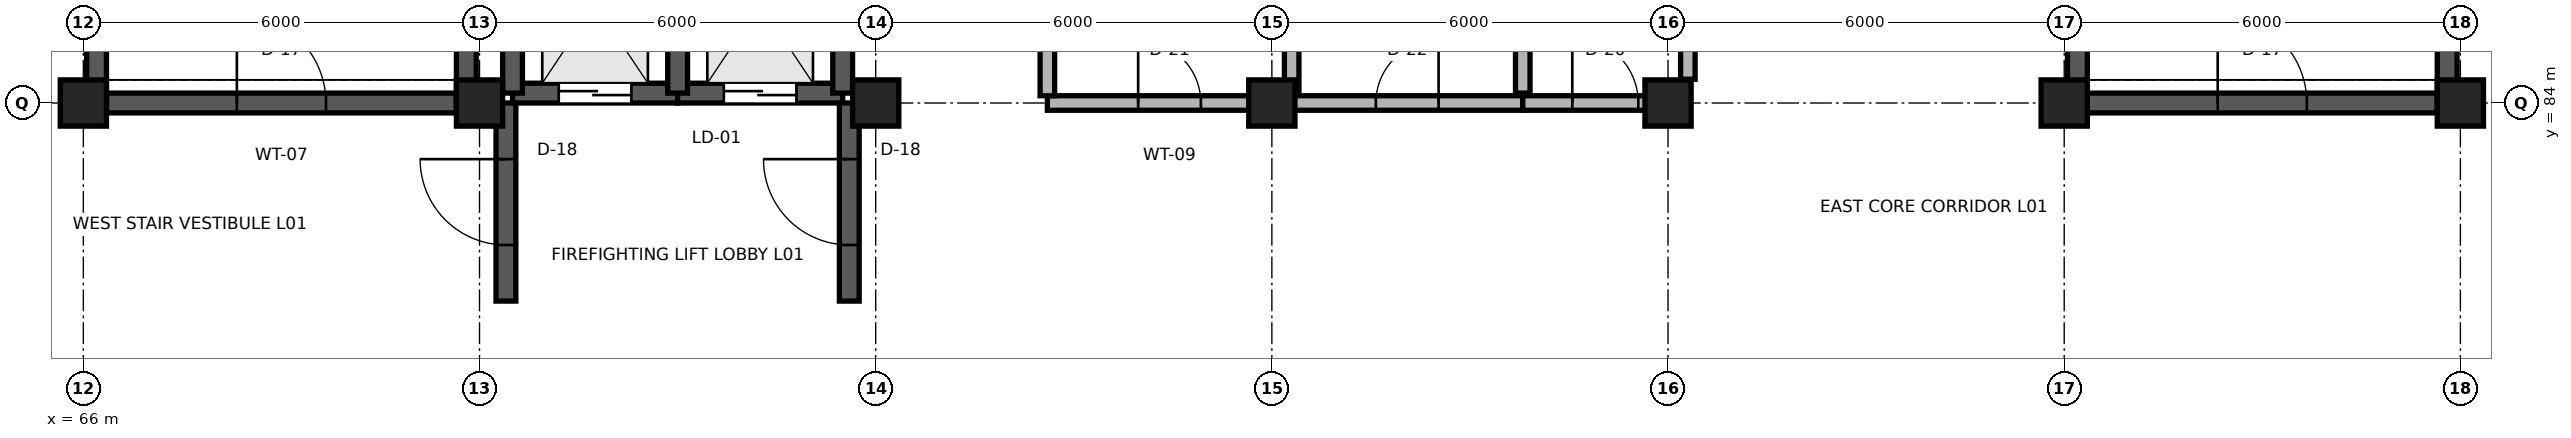
"""IFC4 building model, lengths in metres.
Left out: names, types, materials, properties, quantities, classifications, styles, units other than length and angle.
Written with IfcOpenShell. Run it as: python <this file> out.ifc"""

import sys

from ifc_helpers import new_model, si_unit, direction, frame, frame_2d, origin, origin_2d, place, context, subcontext, project, spatial, rectangle, extrude, element, fill, save


model = new_model("IFC4")
c1 = context("Model", 3, precision=1e-05, world=origin(), true_north=direction((0.0, 1.0)))
c2 = subcontext(c1, "Body", "Model", "MODEL_VIEW")
j1 = project(units=[si_unit("LENGTHUNIT", "METRE"), si_unit("PLANEANGLEUNIT", "RADIAN")], contexts=[c1])
p1 = place(None, origin())
s1 = spatial("IfcSite", under=j1, at=p1, CompositionType="ELEMENT")
p2 = place(p1, origin())
s2 = spatial("IfcBuilding", under=s1, at=p2, CompositionType="ELEMENT")
p3 = place(p2, origin())
s3 = spatial("IfcBuildingStorey", under=s2, at=p3, CompositionType="ELEMENT", Elevation=0.0)
for number, where, z_axis, x_axis in (
    (1, (66.0, 84.0, 0.0), (0.0, 0.0, 1.0), (1.0, 0.0, 0.0)),
    (2, (72.0, 84.0, 0.0), (0.0, 0.0, 1.0), (1.0, 0.0, 0.0)),
    (3, (78.0, 84.0, 0.0), (0.0, 0.0, 1.0), (1.0, 0.0, 0.0)),
    (4, (84.0, 84.0, 0.0), (0.0, 0.0, 1.0), (1.0, 0.0, 0.0)),
    (5, (90.0, 84.0, 0.0), (0.0, 0.0, 1.0), (1.0, 0.0, 0.0)),
    (6, (96.0, 84.0, 0.0), (0.0, 0.0, 1.0), (1.0, 0.0, 0.0)),
    (7, (102.0, 84.0, 0.0), (0.0, 0.0, 1.0), (1.0, 0.0, 0.0)),
):
    element("IfcColumn", number, at=place(p3, frame(where, z_axis=z_axis, x_axis=x_axis)), inside=s3, PredefinedType="COLUMN", context=c2, shape_type="SweptSolid", body=[
        extrude(rectangle(XDim=0.7, YDim=0.7, at=origin_2d()), origin(), (0.0, 0.0, 1.0), 6.0),
    ])
p4 = place(p3, frame((66.35, 84.0, 0.0), z_axis=(0.0, 0.0, 1.0), x_axis=(1.0, 0.0, 0.0)))
e8 = element("IfcWall", 8, at=p4, inside=s3, PredefinedType="SHEAR", context=c2, shape_type="SweptSolid", body=[
    extrude(rectangle(XDim=5.3, YDim=0.3, at=frame_2d((2.65, 0.0))), origin(), (0.0, 0.0, 1.0), 5.76),
])
p5 = place(p4, frame((1.975, 0.0, 0.0)))
e9 = element("IfcOpeningElement", 9, at=p5, cuts=e8, PredefinedType="OPENING", context=c2, shape_type="SweptSolid", body=[
    extrude(rectangle(XDim=1.35, YDim=2.2, at=frame_2d((0.675, 1.1))), frame((0.0, 0.165, 0.0), z_axis=(0.0, -1.0, 0.0), x_axis=(1.0, 0.0, 0.0)), (0.0, 0.0, 1.0), 0.33),
])
for number, where, z_axis, x_axis in (
    (10, (66.2, 84.0, 0.0), (0.0, 0.0, 1.0), (0.0, 1.0, 0.0)),
    (11, (71.8, 84.0, 0.0), (0.0, 0.0, 1.0), (0.0, 1.0, 0.0)),
):
    element("IfcWall", number, at=place(p3, frame(where, z_axis=z_axis, x_axis=x_axis)), inside=s3, PredefinedType="SHEAR", context=c2, shape_type="SweptSolid", body=[
        extrude(rectangle(XDim=11.8, YDim=0.3, at=frame_2d((5.9, 0.0))), origin(), (0.0, 0.0, 1.0), 5.76),
    ])
p6 = place(p3, frame((96.35, 84.0, 0.0), z_axis=(0.0, 0.0, 1.0), x_axis=(1.0, 0.0, 0.0)))
e12 = element("IfcWall", 12, at=p6, inside=s3, PredefinedType="SHEAR", context=c2, shape_type="SweptSolid", body=[
    extrude(rectangle(XDim=5.3, YDim=0.3, at=frame_2d((2.65, 0.0))), origin(), (0.0, 0.0, 1.0), 5.76),
])
p7 = place(p6, frame((1.975, 0.0, 0.0)))
e13 = element("IfcOpeningElement", 13, at=p7, cuts=e12, PredefinedType="OPENING", context=c2, shape_type="SweptSolid", body=[
    extrude(rectangle(XDim=1.35, YDim=2.2, at=frame_2d((0.675, 1.1))), frame((0.0, 0.165, 0.0), z_axis=(0.0, -1.0, 0.0), x_axis=(1.0, 0.0, 0.0)), (0.0, 0.0, 1.0), 0.33),
])
for number, where, z_axis, x_axis in (
    (14, (96.2, 84.0, 0.0), (0.0, 0.0, 1.0), (0.0, 1.0, 0.0)),
    (15, (101.8, 84.0, 0.0), (0.0, 0.0, 1.0), (0.0, 1.0, 0.0)),
):
    element("IfcWall", number, at=place(p3, frame(where, z_axis=z_axis, x_axis=x_axis)), inside=s3, PredefinedType="SHEAR", context=c2, shape_type="SweptSolid", body=[
        extrude(rectangle(XDim=11.8, YDim=0.3, at=frame_2d((5.9, 0.0))), origin(), (0.0, 0.0, 1.0), 5.76),
    ])
p8 = place(p3, frame((72.5, 84.15, 0.0), z_axis=(0.0, 0.0, 1.0), x_axis=(1.0, 0.0, 0.0)))
e16 = element("IfcWall", 16, at=p8, inside=s3, PredefinedType="SHEAR", context=c2, shape_type="SweptSolid", body=[
    extrude(rectangle(XDim=2.5, YDim=0.3, at=frame_2d((1.25, 0.0))), origin(), (0.0, 0.0, 1.0), 5.76),
])
p9 = place(p8, frame((0.7, 0.0, 0.0)))
e17 = element("IfcOpeningElement", 17, at=p9, cuts=e16, PredefinedType="OPENING", context=c2, shape_type="SweptSolid", body=[
    extrude(rectangle(XDim=1.1, YDim=2.1, at=frame_2d((0.55, 1.05))), frame((0.0, 0.165, 0.0), z_axis=(0.0, -1.0, 0.0), x_axis=(1.0, 0.0, 0.0)), (0.0, 0.0, 1.0), 0.33),
])
p10 = place(p3, frame((72.5, 84.15, 0.0), z_axis=(0.0, 0.0, 1.0), x_axis=(0.0, 1.0, 0.0)))
e18 = element("IfcWall", 18, at=p10, inside=s3, PredefinedType="SHEAR", context=c2, shape_type="SweptSolid", body=[
    extrude(rectangle(XDim=3.4, YDim=0.3, at=frame_2d((1.7, 0.0))), origin(), (0.0, 0.0, 1.0), 5.76),
])
p11 = place(p3, frame((75.0, 84.15, 0.0), z_axis=(0.0, 0.0, 1.0), x_axis=(1.0, 0.0, 0.0)))
e19 = element("IfcWall", 19, at=p11, inside=s3, PredefinedType="SHEAR", context=c2, shape_type="SweptSolid", body=[
    extrude(rectangle(XDim=2.5, YDim=0.3, at=frame_2d((1.25, 0.0))), origin(), (0.0, 0.0, 1.0), 5.76),
])
p12 = place(p11, frame((0.7, 0.0, 0.0)))
e20 = element("IfcOpeningElement", 20, at=p12, cuts=e19, PredefinedType="OPENING", context=c2, shape_type="SweptSolid", body=[
    extrude(rectangle(XDim=1.1, YDim=2.1, at=frame_2d((0.55, 1.05))), frame((0.0, 0.165, 0.0), z_axis=(0.0, -1.0, 0.0), x_axis=(1.0, 0.0, 0.0)), (0.0, 0.0, 1.0), 0.33),
])
for number, where, z_axis, x_axis in (
    (21, (75.0, 84.15, 0.0), (0.0, 0.0, 1.0), (0.0, 1.0, 0.0)),
    (22, (77.5, 84.15, 0.0), (0.0, 0.0, 1.0), (0.0, 1.0, 0.0)),
):
    element("IfcWall", number, at=place(p3, frame(where, z_axis=z_axis, x_axis=x_axis)), inside=s3, PredefinedType="SHEAR", context=c2, shape_type="SweptSolid", body=[
        extrude(rectangle(XDim=3.4, YDim=0.3, at=frame_2d((1.7, 0.0))), origin(), (0.0, 0.0, 1.0), 5.76),
    ])
p13 = place(p3, frame((72.4, 81.0, 0.0), z_axis=(0.0, 0.0, 1.0), x_axis=(0.0, 1.0, 0.0)))
e23 = element("IfcWall", 23, at=p13, inside=s3, PredefinedType="SHEAR", context=c2, shape_type="SweptSolid", body=[
    extrude(rectangle(XDim=3.0, YDim=0.3, at=frame_2d((1.5, 0.0))), origin(), (0.0, 0.0, 1.0), 5.76),
])
p14 = place(p13, frame((0.85, 0.0, 0.0)))
e24 = element("IfcOpeningElement", 24, at=p14, cuts=e23, PredefinedType="OPENING", context=c2, shape_type="SweptSolid", body=[
    extrude(rectangle(XDim=1.3, YDim=2.2, at=frame_2d((0.65, 1.1))), frame((0.0, 0.165, 0.0), z_axis=(0.0, -1.0, 0.0), x_axis=(1.0, 0.0, 0.0)), (0.0, 0.0, 1.0), 0.33),
])
p15 = place(p3, frame((77.6, 81.0, 0.0), z_axis=(0.0, 0.0, 1.0), x_axis=(0.0, 1.0, 0.0)))
e25 = element("IfcWall", 25, at=p15, inside=s3, PredefinedType="SHEAR", context=c2, shape_type="SweptSolid", body=[
    extrude(rectangle(XDim=3.0, YDim=0.3, at=frame_2d((1.5, 0.0))), origin(), (0.0, 0.0, 1.0), 5.76),
])
p16 = place(p15, frame((0.85, 0.0, 0.0)))
e26 = element("IfcOpeningElement", 26, at=p16, cuts=e25, PredefinedType="OPENING", context=c2, shape_type="SweptSolid", body=[
    extrude(rectangle(XDim=1.3, YDim=2.2, at=frame_2d((0.65, 1.1))), frame((0.0, 0.165, 0.0), z_axis=(0.0, -1.0, 0.0), x_axis=(1.0, 0.0, 0.0)), (0.0, 0.0, 1.0), 0.33),
])
p17 = place(p3, frame((80.6, 84.0, 0.0), z_axis=(0.0, 0.0, 1.0), x_axis=(1.0, 0.0, 0.0)))
e27 = element("IfcWall", 27, at=p17, inside=s3, PredefinedType="PARTITIONING", context=c2, shape_type="SweptSolid", body=[
    extrude(rectangle(XDim=3.7, YDim=0.22, at=frame_2d((1.85, 0.0))), origin(), (0.0, 0.0, 1.0), 5.32),
])
p18 = place(p17, frame((1.375, 0.0, 0.0)))
e28 = element("IfcOpeningElement", 28, at=p18, cuts=e27, PredefinedType="OPENING", context=c2, shape_type="SweptSolid", body=[
    extrude(rectangle(XDim=0.95, YDim=2.15, at=frame_2d((0.475, 1.075))), frame((0.0, 0.125, 0.0), z_axis=(0.0, -1.0, 0.0), x_axis=(1.0, 0.0, 0.0)), (0.0, 0.0, 1.0), 0.25),
])
p19 = place(p3, frame((84.3, 84.0, 0.0), z_axis=(0.0, 0.0, 1.0), x_axis=(1.0, 0.0, 0.0)))
e29 = element("IfcWall", 29, at=p19, inside=s3, PredefinedType="PARTITIONING", context=c2, shape_type="SweptSolid", body=[
    extrude(rectangle(XDim=3.5, YDim=0.22, at=frame_2d((1.75, 0.0))), origin(), (0.0, 0.0, 1.0), 5.32),
])
p20 = place(p19, frame((1.275, 0.0, 0.0)))
e30 = element("IfcOpeningElement", 30, at=p20, cuts=e29, PredefinedType="OPENING", context=c2, shape_type="SweptSolid", body=[
    extrude(rectangle(XDim=0.95, YDim=2.1, at=frame_2d((0.475, 1.05))), frame((0.0, 0.125, 0.0), z_axis=(0.0, -1.0, 0.0), x_axis=(1.0, 0.0, 0.0)), (0.0, 0.0, 1.0), 0.25),
])
p21 = place(p3, frame((87.8, 84.0, 0.0), z_axis=(0.0, 0.0, 1.0), x_axis=(1.0, 0.0, 0.0)))
e31 = element("IfcWall", 31, at=p21, inside=s3, PredefinedType="PARTITIONING", context=c2, shape_type="SweptSolid", body=[
    extrude(rectangle(XDim=2.5, YDim=0.22, at=frame_2d((1.25, 0.0))), origin(), (0.0, 0.0, 1.0), 5.32),
])
p22 = place(p21, frame((0.75, 0.0, 0.0)))
e32 = element("IfcOpeningElement", 32, at=p22, cuts=e31, PredefinedType="OPENING", context=c2, shape_type="SweptSolid", body=[
    extrude(rectangle(XDim=1.0, YDim=2.15, at=frame_2d((0.5, 1.075))), frame((0.0, 0.125, 0.0), z_axis=(0.0, -1.0, 0.0), x_axis=(1.0, 0.0, 0.0)), (0.0, 0.0, 1.0), 0.25),
])
for number, where, z_axis, x_axis in (
    (33, (84.3, 84.15, 0.0), (0.0, 0.0, 1.0), (0.0, 1.0, 0.0)),
    (34, (87.8, 84.15, 0.0), (0.0, 0.0, 1.0), (0.0, 1.0, 0.0)),
):
    element("IfcWall", number, at=place(p3, frame(where, z_axis=z_axis, x_axis=x_axis)), inside=s3, PredefinedType="PARTITIONING", context=c2, shape_type="SweptSolid", body=[
        extrude(rectangle(XDim=5.0, YDim=0.22, at=frame_2d((2.5, 0.0))), origin(), (0.0, 0.0, 1.0), 5.76),
    ])
p23 = place(p3, frame((80.6, 84.11, 0.0), z_axis=(0.0, 0.0, 1.0), x_axis=(0.0, 1.0, 0.0)))
e35 = element("IfcWall", 35, at=p23, inside=s3, PredefinedType="PARTITIONING", context=c2, shape_type="SweptSolid", body=[
    extrude(rectangle(XDim=4.98, YDim=0.22, at=frame_2d((2.49, 0.0))), origin(), (0.0, 0.0, 1.0), 5.76),
])
p24 = place(p3, frame((90.3, 84.36, 0.0), z_axis=(0.0, 0.0, 1.0), x_axis=(0.0, 1.0, 0.0)))
e36 = element("IfcWall", 36, at=p24, inside=s3, PredefinedType="PARTITIONING", context=c2, shape_type="SweptSolid", body=[
    extrude(rectangle(XDim=4.73, YDim=0.22, at=frame_2d((2.365, 0.0))), origin(), (0.0, 0.0, 1.0), 5.76),
])
p25 = place(p5, origin())
e37 = element("IfcDoor", 37, at=p25, inside=s3, OperationType="SINGLE_SWING_LEFT", PredefinedType="DOOR", context=c2, shape_type="SweptSolid", body=[
    extrude(rectangle(XDim=1.35, YDim=2.2, at=frame_2d((0.675, 1.1))), frame((0.0, 0.025, 0.0), z_axis=(0.0, -1.0, 0.0), x_axis=(1.0, 0.0, 0.0)), (0.0, 0.0, 1.0), 0.05),
])
fill(e9, e37)
p26 = place(p7, origin())
e38 = element("IfcDoor", 38, at=p26, inside=s3, OperationType="SINGLE_SWING_LEFT", PredefinedType="DOOR", context=c2, shape_type="SweptSolid", body=[
    extrude(rectangle(XDim=1.35, YDim=2.2, at=frame_2d((0.675, 1.1))), frame((0.0, 0.025, 0.0), z_axis=(0.0, -1.0, 0.0), x_axis=(1.0, 0.0, 0.0)), (0.0, 0.0, 1.0), 0.05),
])
fill(e13, e38)
p27 = place(p9, origin())
e39 = element("IfcDoor", 39, at=p27, inside=s3, OperationType="DOUBLE_DOOR_SLIDING", PredefinedType="DOOR", context=c2, shape_type="SweptSolid", body=[
    extrude(rectangle(XDim=1.1, YDim=2.1, at=frame_2d((0.55, 1.05))), frame((0.0, 0.025, 0.0), z_axis=(0.0, -1.0, 0.0), x_axis=(1.0, 0.0, 0.0)), (0.0, 0.0, 1.0), 0.05),
])
fill(e17, e39)
p28 = place(p12, origin())
e40 = element("IfcDoor", 40, at=p28, inside=s3, OperationType="DOUBLE_DOOR_SLIDING", PredefinedType="DOOR", context=c2, shape_type="SweptSolid", body=[
    extrude(rectangle(XDim=1.1, YDim=2.1, at=frame_2d((0.55, 1.05))), frame((0.0, 0.025, 0.0), z_axis=(0.0, -1.0, 0.0), x_axis=(1.0, 0.0, 0.0)), (0.0, 0.0, 1.0), 0.05),
])
fill(e20, e40)
p29 = place(p14, origin())
e41 = element("IfcDoor", 41, at=p29, inside=s3, OperationType="SINGLE_SWING_RIGHT", PredefinedType="DOOR", context=c2, shape_type="SweptSolid", body=[
    extrude(rectangle(XDim=1.3, YDim=2.2, at=frame_2d((0.65, 1.1))), frame((0.0, 0.025, 0.0), z_axis=(0.0, -1.0, 0.0), x_axis=(1.0, 0.0, 0.0)), (0.0, 0.0, 1.0), 0.05),
])
fill(e24, e41)
p30 = place(p16, origin())
e42 = element("IfcDoor", 42, at=p30, inside=s3, OperationType="SINGLE_SWING_RIGHT", PredefinedType="DOOR", context=c2, shape_type="SweptSolid", body=[
    extrude(rectangle(XDim=1.3, YDim=2.2, at=frame_2d((0.65, 1.1))), frame((0.0, 0.025, 0.0), z_axis=(0.0, -1.0, 0.0), x_axis=(1.0, 0.0, 0.0)), (0.0, 0.0, 1.0), 0.05),
])
fill(e26, e42)
p31 = place(p18, origin())
e43 = element("IfcDoor", 43, at=p31, inside=s3, OperationType="SINGLE_SWING_LEFT", PredefinedType="DOOR", context=c2, shape_type="SweptSolid", body=[
    extrude(rectangle(XDim=0.95, YDim=2.15, at=frame_2d((0.475, 1.075))), frame((0.0, 0.025, 0.0), z_axis=(0.0, -1.0, 0.0), x_axis=(1.0, 0.0, 0.0)), (0.0, 0.0, 1.0), 0.05),
])
fill(e28, e43)
p32 = place(p20, origin())
e44 = element("IfcDoor", 44, at=p32, inside=s3, OperationType="SINGLE_SWING_RIGHT", PredefinedType="DOOR", context=c2, shape_type="SweptSolid", body=[
    extrude(rectangle(XDim=0.95, YDim=2.1, at=frame_2d((0.475, 1.05))), frame((0.0, 0.025, 0.0), z_axis=(0.0, -1.0, 0.0), x_axis=(1.0, 0.0, 0.0)), (0.0, 0.0, 1.0), 0.05),
])
fill(e30, e44)
p33 = place(p22, origin())
e45 = element("IfcDoor", 45, at=p33, inside=s3, OperationType="SINGLE_SWING_LEFT", PredefinedType="DOOR", context=c2, shape_type="SweptSolid", body=[
    extrude(rectangle(XDim=1.0, YDim=2.15, at=frame_2d((0.5, 1.075))), frame((0.0, 0.025, 0.0), z_axis=(0.0, -1.0, 0.0), x_axis=(1.0, 0.0, 0.0)), (0.0, 0.0, 1.0), 0.05),
])
fill(e32, e45)
save(model, sys.argv[1])
